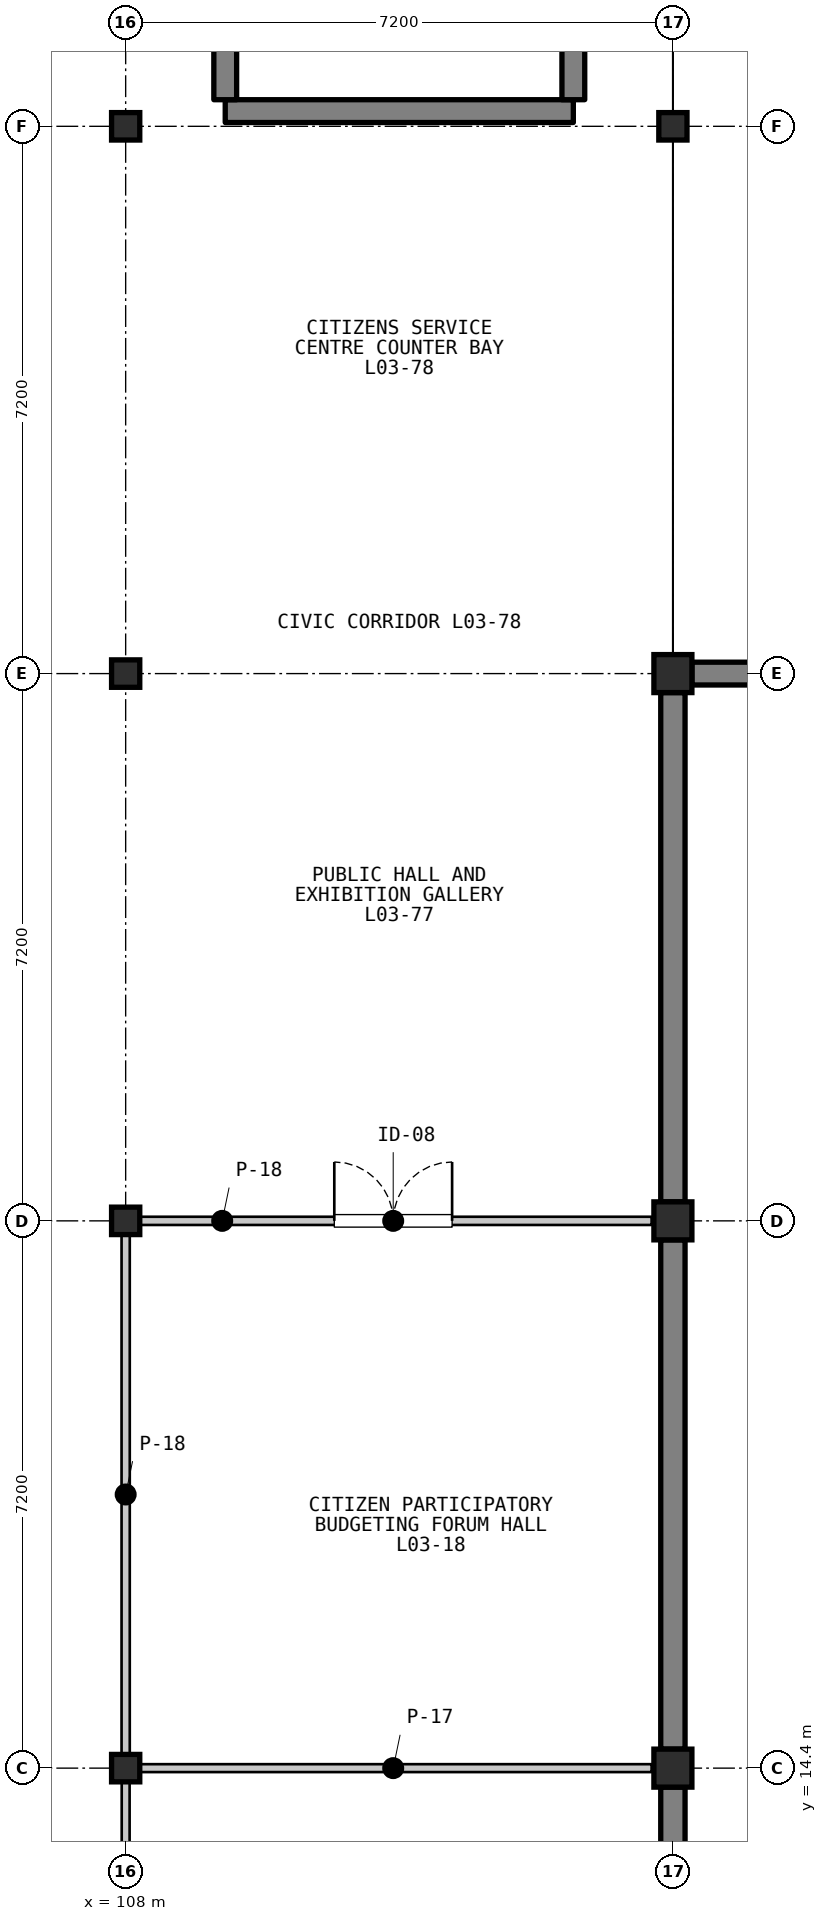
"""IFC4 building model, lengths in metres.
Left out: names, types, materials, properties, quantities, classifications, styles, units other than length and angle.
Written with IfcOpenShell. Run it as: python <this file> out.ifc"""

import sys

from ifc_helpers import new_model, si_unit, direction, frame, frame_2d, origin, origin_2d, place, context, subcontext, project, spatial, rectangle, i_section, extrude, element, fill, save


model = new_model("IFC4")
c1 = context("Model", 3, precision=1e-05, world=origin(), true_north=direction((0.0, 1.0)))
c2 = subcontext(c1, "Body", "Model", "MODEL_VIEW")
j1 = project(units=[si_unit("LENGTHUNIT", "METRE"), si_unit("PLANEANGLEUNIT", "RADIAN")], contexts=[c1])
p1 = place(None, origin())
s1 = spatial("IfcSite", under=j1, at=p1, CompositionType="ELEMENT")
p2 = place(p1, origin())
s2 = spatial("IfcBuilding", under=s1, at=p2, CompositionType="ELEMENT")
p3 = place(p2, frame((0.0, 0.0, 9.9)))
s3 = spatial("IfcBuildingStorey", under=s2, at=p3, CompositionType="ELEMENT", Elevation=9.9)
for number, where, z_axis, x_axis in (
    (1, (108.0, 14.4, 0.0), (0.0, 0.0, 1.0), (1.0, 0.0, 0.0)),
    (2, (108.0, 21.6, 0.0), (0.0, 0.0, 1.0), (1.0, 0.0, 0.0)),
    (3, (108.0, 28.8, 0.0), (0.0, 0.0, 1.0), (1.0, 0.0, 0.0)),
    (4, (108.0, 36.0, 0.0), (0.0, 0.0, 1.0), (1.0, 0.0, 0.0)),
):
    element("IfcColumn", number, at=place(p3, frame(where, z_axis=z_axis, x_axis=x_axis)), inside=s3, PredefinedType="COLUMN", context=c2, shape_type="SweptSolid", body=[
        extrude(i_section(OverallWidth=0.371, OverallDepth=0.361, WebThickness=0.012, FlangeThickness=0.02, FilletRadius=0.015, at=origin_2d()), origin(), (0.0, 0.0, 1.0), 4.2),
    ])
for number, where, z_axis, x_axis in (
    (5, (115.2, 14.4, 0.0), (0.0, 0.0, 1.0), (1.0, 0.0, 0.0)),
    (6, (115.2, 21.6, 0.0), (0.0, 0.0, 1.0), (1.0, 0.0, 0.0)),
    (7, (115.2, 28.8, 0.0), (0.0, 0.0, 1.0), (1.0, 0.0, 0.0)),
):
    element("IfcColumn", number, at=place(p3, frame(where, z_axis=z_axis, x_axis=x_axis)), inside=s3, PredefinedType="COLUMN", context=c2, shape_type="SweptSolid", body=[
        extrude(rectangle(XDim=0.5, YDim=0.5, at=origin_2d()), origin(), (0.0, 0.0, 1.0), 4.2),
    ])
p4 = place(p3, frame((115.2, 36.0, 0.0), z_axis=(0.0, 0.0, 1.0), x_axis=(1.0, 0.0, 0.0)))
e8 = element("IfcColumn", 8, at=p4, inside=s3, PredefinedType="COLUMN", context=c2, shape_type="SweptSolid", body=[
    extrude(i_section(OverallWidth=0.371, OverallDepth=0.361, WebThickness=0.012, FlangeThickness=0.02, FilletRadius=0.015, at=origin_2d()), origin(), (0.0, 0.0, 1.0), 4.2),
])
p5 = place(p3, frame((115.2, 14.15, 0.0), z_axis=(0.0, 0.0, 1.0), x_axis=(0.0, -1.0, 0.0)))
e9 = element("IfcWall", 9, at=p5, inside=s3, PredefinedType="SOLIDWALL", context=c2, shape_type="SweptSolid", body=[
    extrude(rectangle(XDim=6.7, YDim=0.32, at=frame_2d((3.35, 0.0))), origin(), (0.0, 0.0, 1.0), 3.487),
])
p6 = place(p3, frame((115.2, 21.35, 0.0), z_axis=(0.0, 0.0, 1.0), x_axis=(0.0, -1.0, 0.0)))
e10 = element("IfcWall", 10, at=p6, inside=s3, PredefinedType="SOLIDWALL", context=c2, shape_type="SweptSolid", body=[
    extrude(rectangle(XDim=6.7, YDim=0.32, at=frame_2d((3.35, 0.0))), origin(), (0.0, 0.0, 1.0), 3.487),
])
p7 = place(p3, frame((115.2, 28.55, 0.0), z_axis=(0.0, 0.0, 1.0), x_axis=(0.0, -1.0, 0.0)))
e11 = element("IfcWall", 11, at=p7, inside=s3, PredefinedType="SOLIDWALL", context=c2, shape_type="SweptSolid", body=[
    extrude(rectangle(XDim=6.7, YDim=0.32, at=frame_2d((3.35, 0.0))), origin(), (0.0, 0.0, 1.0), 3.487),
])
p8 = place(p3, frame((122.15, 28.8, 0.0), z_axis=(0.0, 0.0, 1.0), x_axis=(-1.0, 0.0, 0.0)))
e12 = element("IfcWall", 12, at=p8, inside=s3, PredefinedType="SOLIDWALL", context=c2, shape_type="SweptSolid", body=[
    extrude(rectangle(XDim=6.7, YDim=0.3, at=frame_2d((3.35, 0.0))), origin(), (0.0, 0.0, 1.0), 3.398),
])
p9 = place(p8, frame((1.008, 0.0, 0.95)))
e13 = element("IfcOpeningElement", 13, at=p9, cuts=e12, PredefinedType="OPENING", context=c2, shape_type="SweptSolid", body=[
    extrude(rectangle(XDim=1.2, YDim=1.7, at=frame_2d((0.6, 0.85))), frame((0.0, 0.16, 0.0), z_axis=(0.0, -1.0, 0.0), x_axis=(1.0, 0.0, 0.0)), (0.0, 0.0, 1.0), 0.32),
])
p10 = place(p8, frame((4.492, 0.0, 0.95)))
e14 = element("IfcOpeningElement", 14, at=p10, cuts=e12, PredefinedType="OPENING", context=c2, shape_type="SweptSolid", body=[
    extrude(rectangle(XDim=1.2, YDim=1.7, at=frame_2d((0.6, 0.85))), frame((0.0, 0.16, 0.0), z_axis=(0.0, -1.0, 0.0), x_axis=(1.0, 0.0, 0.0)), (0.0, 0.0, 1.0), 0.32),
])
p11 = place(p3, frame((109.31, 36.2, 0.0), z_axis=(0.0, 0.0, 1.0), x_axis=(1.0, 0.0, 0.0)))
e15 = element("IfcWall", 15, at=p11, inside=s3, PredefinedType="SHEAR", context=c2, shape_type="SweptSolid", body=[
    extrude(rectangle(XDim=4.58, YDim=0.3, at=frame_2d((2.29, 0.0))), origin(), (0.0, 0.0, 1.0), 4.02),
])
for number, where, z_axis, x_axis in (
    (16, (109.31, 36.35, 0.0), (0.0, 0.0, 1.0), (0.0, 1.0, 0.0)),
    (17, (113.89, 36.35, 0.0), (0.0, 0.0, 1.0), (0.0, 1.0, 0.0)),
):
    element("IfcWall", number, at=place(p3, frame(where, z_axis=z_axis, x_axis=x_axis)), inside=s3, PredefinedType="SHEAR", context=c2, shape_type="SweptSolid", body=[
        extrude(rectangle(XDim=9.3, YDim=0.3, at=frame_2d((4.65, 0.0))), origin(), (0.0, 0.0, 1.0), 4.02),
    ])
p12 = place(p3, frame((108.0, 7.32, 0.0), z_axis=(0.0, 0.0, 1.0), x_axis=(0.0, 1.0, 0.0)))
e18 = element("IfcWall", 18, at=p12, inside=s3, PredefinedType="PARTITIONING", context=c2, shape_type="SweptSolid", body=[
    extrude(rectangle(XDim=6.96, YDim=0.104, at=frame_2d((3.48, 0.0))), origin(), (0.0, 0.0, 1.0), 3.408),
])
p13 = place(p12, frame((2.53, 0.0, 0.0)))
e19 = element("IfcOpeningElement", 19, at=p13, cuts=e18, PredefinedType="OPENING", context=c2, shape_type="SweptSolid", body=[
    extrude(rectangle(XDim=1.9, YDim=2.45, at=frame_2d((0.95, 1.225))), frame((0.0, 0.062, 0.0), z_axis=(0.0, -1.0, 0.0), x_axis=(1.0, 0.0, 0.0)), (0.0, 0.0, 1.0), 0.124),
])
p14 = place(p3, frame((108.12, 14.4, 0.0), z_axis=(0.0, 0.0, 1.0), x_axis=(1.0, 0.0, 0.0)))
e20 = element("IfcWall", 20, at=p14, inside=s3, PredefinedType="PARTITIONING", context=c2, shape_type="SweptSolid", body=[
    extrude(rectangle(XDim=6.8, YDim=0.104, at=frame_2d((3.4, 0.0))), origin(), (0.0, 0.0, 1.0), 3.408),
])
p15 = place(p3, frame((108.12, 21.6, 0.0), z_axis=(0.0, 0.0, 1.0), x_axis=(1.0, 0.0, 0.0)))
e21 = element("IfcWall", 21, at=p15, inside=s3, PredefinedType="PARTITIONING", context=c2, shape_type="SweptSolid", body=[
    extrude(rectangle(XDim=6.8, YDim=0.108, at=frame_2d((3.4, 0.0))), origin(), (0.0, 0.0, 1.0), 3.408),
])
p16 = place(p15, frame((2.625, 0.0, 0.0)))
e22 = element("IfcOpeningElement", 22, at=p16, cuts=e21, PredefinedType="OPENING", context=c2, shape_type="SweptSolid", body=[
    extrude(rectangle(XDim=1.55, YDim=2.3, at=frame_2d((0.775, 1.15))), frame((0.0, 0.064, 0.0), z_axis=(0.0, -1.0, 0.0), x_axis=(1.0, 0.0, 0.0)), (0.0, 0.0, 1.0), 0.128),
])
p17 = place(p3, frame((108.0, 14.52, 0.0), z_axis=(0.0, 0.0, 1.0), x_axis=(0.0, 1.0, 0.0)))
e23 = element("IfcWall", 23, at=p17, inside=s3, PredefinedType="PARTITIONING", context=c2, shape_type="SweptSolid", body=[
    extrude(rectangle(XDim=6.96, YDim=0.108, at=frame_2d((3.48, 0.0))), origin(), (0.0, 0.0, 1.0), 3.408),
])
p18 = place(p16, origin())
e24 = element("IfcDoor", 24, at=p18, inside=s3, OperationType="DOUBLE_DOOR_SINGLE_SWING", PredefinedType="DOOR", context=c2, shape_type="SweptSolid", body=[
    extrude(rectangle(XDim=1.55, YDim=2.3, at=frame_2d((0.775, 1.15))), frame((0.0, 0.025, 0.0), z_axis=(0.0, -1.0, 0.0), x_axis=(1.0, 0.0, 0.0)), (0.0, 0.0, 1.0), 0.05),
])
fill(e22, e24)
save(model, sys.argv[1])
